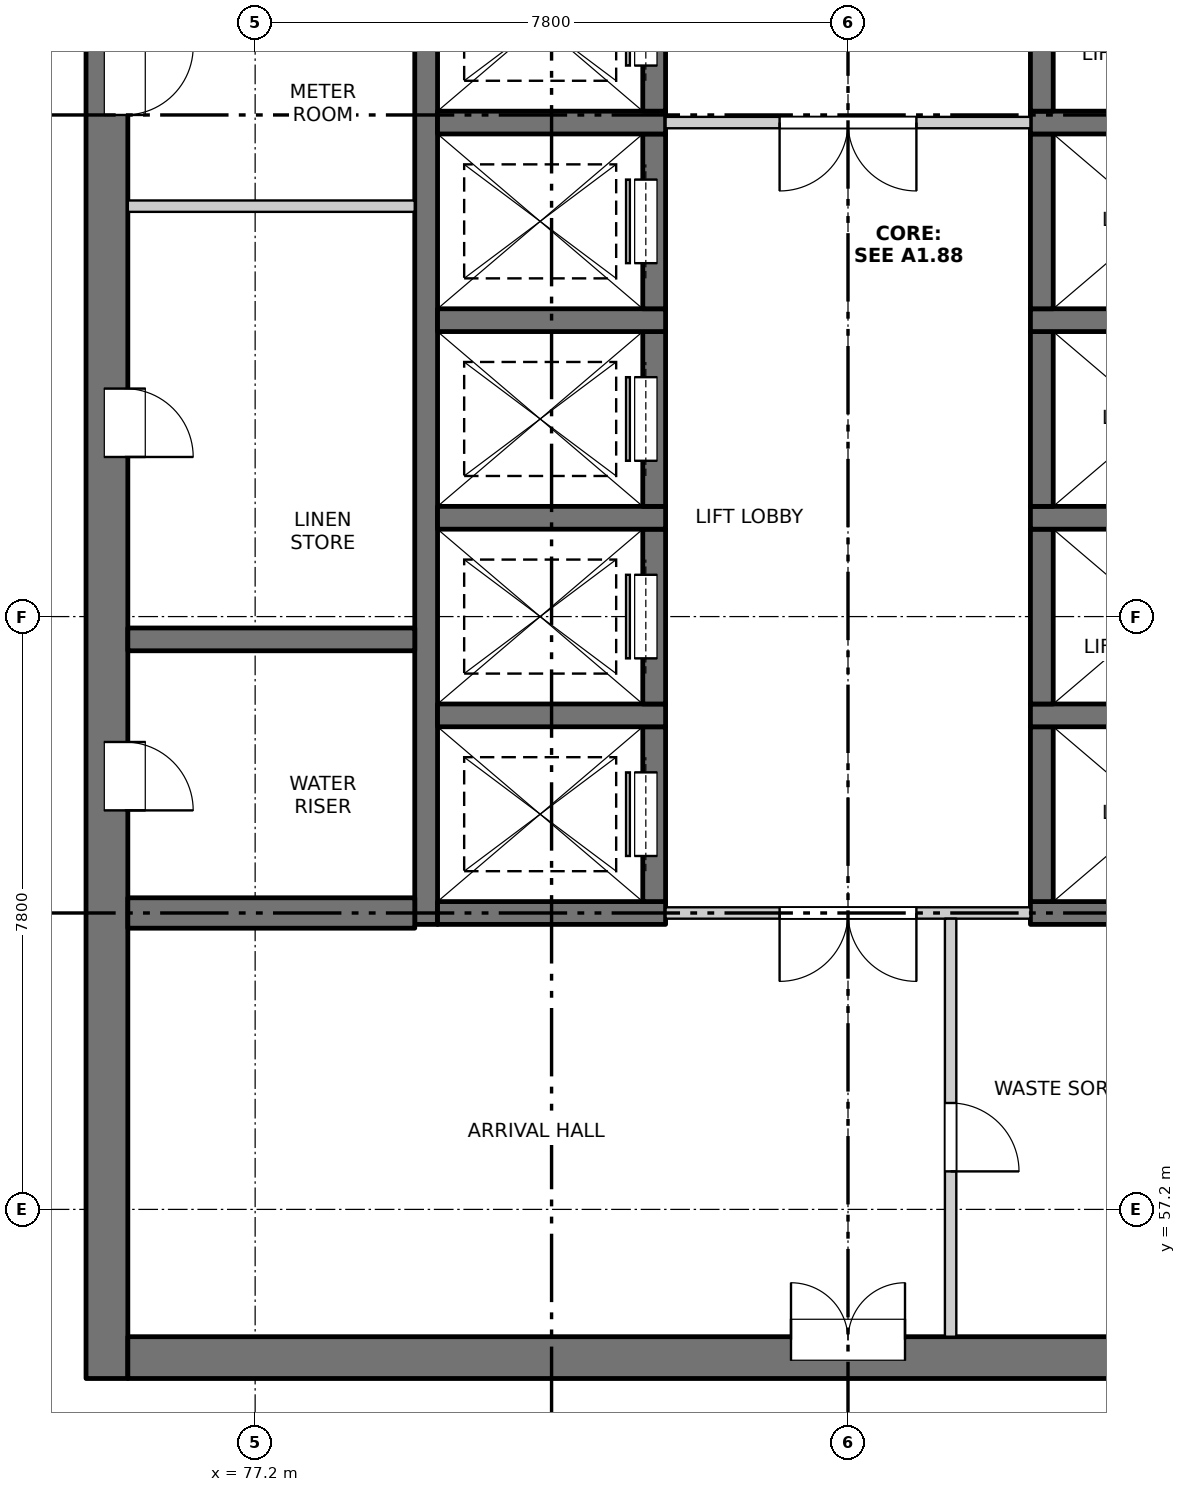
"""IFC4 building model, lengths in metres.
Left out: names, types, materials, properties, quantities, classifications, styles, units other than length and angle.
Written with IfcOpenShell. Run it as: python <this file> out.ifc"""

import sys

from ifc_helpers import new_model, si_unit, direction, frame, frame_2d, origin, place, context, subcontext, project, spatial, rectangle, extrude, element, fill, save


model = new_model("IFC4")
c1 = context("Model", 3, precision=1e-05, world=origin(), true_north=direction((0.0, 1.0)))
c2 = subcontext(c1, "Body", "Model", "MODEL_VIEW")
j1 = project(units=[si_unit("LENGTHUNIT", "METRE"), si_unit("PLANEANGLEUNIT", "RADIAN")], contexts=[c1])
p1 = place(None, origin())
s1 = spatial("IfcSite", under=j1, at=p1, CompositionType="ELEMENT")
p2 = place(p1, origin())
s2 = spatial("IfcBuilding", under=s1, at=p2, CompositionType="ELEMENT")
p3 = place(p2, frame((0.0, 0.0, 130.5)))
s3 = spatial("IfcBuildingStorey", under=s2, at=p3, CompositionType="ELEMENT", Elevation=130.5)
p4 = place(p3, frame((75.25, 54.975, -0.25), z_axis=(0.0, 0.0, 1.0), x_axis=(0.0, 1.0, 0.0)))
e1 = element("IfcWall", 1, at=p4, inside=s3, PredefinedType="SOLIDWALL", context=c2, shape_type="SweptSolid", body=[
    extrude(rectangle(XDim=22.325, YDim=0.55, at=frame_2d((11.163, 0.0))), origin(), (0.0, 0.0, 1.0), 3.4),
])
p5 = place(p4, frame((7.475, 0.0, 0.25)))
e2 = element("IfcOpeningElement", 2, at=p5, cuts=e1, PredefinedType="OPENING", context=c2, shape_type="SweptSolid", body=[
    extrude(rectangle(XDim=0.9, YDim=2.1, at=frame_2d((0.45, 1.05))), frame((0.0, 0.285, 0.0), z_axis=(0.0, -1.0, 0.0), x_axis=(1.0, 0.0, 0.0)), (0.0, 0.0, 1.0), 0.57),
])
p6 = place(p4, frame((12.125, 0.0, 0.25)))
e3 = element("IfcOpeningElement", 3, at=p6, cuts=e1, PredefinedType="OPENING", context=c2, shape_type="SweptSolid", body=[
    extrude(rectangle(XDim=0.9, YDim=2.1, at=frame_2d((0.45, 1.05))), frame((0.0, 0.285, 0.0), z_axis=(0.0, -1.0, 0.0), x_axis=(1.0, 0.0, 0.0)), (0.0, 0.0, 1.0), 0.57),
])
p7 = place(p4, frame((16.625, 0.0, 0.25)))
e4 = element("IfcOpeningElement", 4, at=p7, cuts=e1, PredefinedType="OPENING", context=c2, shape_type="SweptSolid", body=[
    extrude(rectangle(XDim=0.9, YDim=2.1, at=frame_2d((0.45, 1.05))), frame((0.0, 0.285, 0.0), z_axis=(0.0, -1.0, 0.0), x_axis=(1.0, 0.0, 0.0)), (0.0, 0.0, 1.0), 0.57),
])
p8 = place(p4, frame((20.075, 0.0, 0.25)))
e5 = element("IfcOpeningElement", 5, at=p8, cuts=e1, PredefinedType="OPENING", context=c2, shape_type="SweptSolid", body=[
    extrude(rectangle(XDim=0.9, YDim=2.1, at=frame_2d((0.45, 1.05))), frame((0.0, 0.285, 0.0), z_axis=(0.0, -1.0, 0.0), x_axis=(1.0, 0.0, 0.0)), (0.0, 0.0, 1.0), 0.57),
])
p9 = place(p3, frame((75.525, 55.25, -0.25), z_axis=(0.0, 0.0, 1.0), x_axis=(1.0, 0.0, 0.0)))
e6 = element("IfcWall", 6, at=p9, inside=s3, PredefinedType="SOLIDWALL", context=c2, shape_type="SweptSolid", body=[
    extrude(rectangle(XDim=18.95, YDim=0.55, at=frame_2d((9.475, 0.0))), origin(), (0.0, 0.0, 1.0), 3.4),
])
p10 = place(p9, frame((8.725, 0.0, 0.25)))
e7 = element("IfcOpeningElement", 7, at=p10, cuts=e6, PredefinedType="OPENING", context=c2, shape_type="SweptSolid", body=[
    extrude(rectangle(XDim=1.5, YDim=2.1, at=frame_2d((0.75, 1.05))), frame((0.0, 0.285, 0.0), z_axis=(0.0, -1.0, 0.0), x_axis=(1.0, 0.0, 0.0)), (0.0, 0.0, 1.0), 0.57),
])
p11 = place(p3, frame((79.45, 60.95, -0.25), z_axis=(0.0, 0.0, 1.0), x_axis=(0.0, 1.0, 0.0)))
e8 = element("IfcWall", 8, at=p11, inside=s3, PredefinedType="SOLIDWALL", context=c2, shape_type="SweptSolid", body=[
    extrude(rectangle(XDim=16.35, YDim=0.3, at=frame_2d((8.175, 0.0))), origin(), (0.0, 0.0, 1.0), 3.4),
])
p12 = place(p3, frame((79.6, 61.1, -0.25), z_axis=(0.0, 0.0, 1.0), x_axis=(1.0, 0.0, 0.0)))
e9 = element("IfcWall", 9, at=p12, inside=s3, PredefinedType="SOLIDWALL", context=c2, shape_type="SweptSolid", body=[
    extrude(rectangle(XDim=3.0, YDim=0.3, at=frame_2d((1.5, 0.0))), origin(), (0.0, 0.0, 1.0), 3.4),
])
p13 = place(p3, frame((82.45, 61.25, -0.25), z_axis=(0.0, 0.0, 1.0), x_axis=(0.0, 1.0, 0.0)))
e10 = element("IfcWall", 10, at=p13, inside=s3, PredefinedType="SOLIDWALL", context=c2, shape_type="SweptSolid", body=[
    extrude(rectangle(XDim=2.3, YDim=0.3, at=frame_2d((1.15, 0.0))), origin(), (0.0, 0.0, 1.0), 3.4),
])
p14 = place(p13, frame((0.6, 0.0, 0.25)))
e11 = element("IfcOpeningElement", 11, at=p14, cuts=e10, PredefinedType="OPENING", context=c2, shape_type="SweptSolid", body=[
    extrude(rectangle(XDim=1.1, YDim=2.1, at=frame_2d((0.55, 1.05))), frame((0.0, 0.16, 0.0), z_axis=(0.0, -1.0, 0.0), x_axis=(1.0, 0.0, 0.0)), (0.0, 0.0, 1.0), 0.32),
])
p15 = place(p3, frame((79.6, 63.7, -0.25), z_axis=(0.0, 0.0, 1.0), x_axis=(1.0, 0.0, 0.0)))
e12 = element("IfcWall", 12, at=p15, inside=s3, PredefinedType="SOLIDWALL", context=c2, shape_type="SweptSolid", body=[
    extrude(rectangle(XDim=3.0, YDim=0.3, at=frame_2d((1.5, 0.0))), origin(), (0.0, 0.0, 1.0), 3.4),
])
p16 = place(p3, frame((82.45, 63.85, -0.25), z_axis=(0.0, 0.0, 1.0), x_axis=(0.0, 1.0, 0.0)))
e13 = element("IfcWall", 13, at=p16, inside=s3, PredefinedType="SOLIDWALL", context=c2, shape_type="SweptSolid", body=[
    extrude(rectangle(XDim=2.3, YDim=0.3, at=frame_2d((1.15, 0.0))), origin(), (0.0, 0.0, 1.0), 3.4),
])
p17 = place(p16, frame((0.6, 0.0, 0.25)))
e14 = element("IfcOpeningElement", 14, at=p17, cuts=e13, PredefinedType="OPENING", context=c2, shape_type="SweptSolid", body=[
    extrude(rectangle(XDim=1.1, YDim=2.1, at=frame_2d((0.55, 1.05))), frame((0.0, 0.16, 0.0), z_axis=(0.0, -1.0, 0.0), x_axis=(1.0, 0.0, 0.0)), (0.0, 0.0, 1.0), 0.32),
])
p18 = place(p3, frame((79.6, 66.3, -0.25), z_axis=(0.0, 0.0, 1.0), x_axis=(1.0, 0.0, 0.0)))
e15 = element("IfcWall", 15, at=p18, inside=s3, PredefinedType="SOLIDWALL", context=c2, shape_type="SweptSolid", body=[
    extrude(rectangle(XDim=3.0, YDim=0.3, at=frame_2d((1.5, 0.0))), origin(), (0.0, 0.0, 1.0), 3.4),
])
p19 = place(p3, frame((82.45, 66.45, -0.25), z_axis=(0.0, 0.0, 1.0), x_axis=(0.0, 1.0, 0.0)))
e16 = element("IfcWall", 16, at=p19, inside=s3, PredefinedType="SOLIDWALL", context=c2, shape_type="SweptSolid", body=[
    extrude(rectangle(XDim=2.3, YDim=0.3, at=frame_2d((1.15, 0.0))), origin(), (0.0, 0.0, 1.0), 3.4),
])
p20 = place(p19, frame((0.6, 0.0, 0.25)))
e17 = element("IfcOpeningElement", 17, at=p20, cuts=e16, PredefinedType="OPENING", context=c2, shape_type="SweptSolid", body=[
    extrude(rectangle(XDim=1.1, YDim=2.1, at=frame_2d((0.55, 1.05))), frame((0.0, 0.16, 0.0), z_axis=(0.0, -1.0, 0.0), x_axis=(1.0, 0.0, 0.0)), (0.0, 0.0, 1.0), 0.32),
])
p21 = place(p3, frame((79.6, 68.9, -0.25), z_axis=(0.0, 0.0, 1.0), x_axis=(1.0, 0.0, 0.0)))
e18 = element("IfcWall", 18, at=p21, inside=s3, PredefinedType="SOLIDWALL", context=c2, shape_type="SweptSolid", body=[
    extrude(rectangle(XDim=3.0, YDim=0.3, at=frame_2d((1.5, 0.0))), origin(), (0.0, 0.0, 1.0), 3.4),
])
p22 = place(p3, frame((82.45, 69.05, -0.25), z_axis=(0.0, 0.0, 1.0), x_axis=(0.0, 1.0, 0.0)))
e19 = element("IfcWall", 19, at=p22, inside=s3, PredefinedType="SOLIDWALL", context=c2, shape_type="SweptSolid", body=[
    extrude(rectangle(XDim=2.3, YDim=0.3, at=frame_2d((1.15, 0.0))), origin(), (0.0, 0.0, 1.0), 3.4),
])
p23 = place(p22, frame((0.6, 0.0, 0.25)))
e20 = element("IfcOpeningElement", 20, at=p23, cuts=e19, PredefinedType="OPENING", context=c2, shape_type="SweptSolid", body=[
    extrude(rectangle(XDim=1.1, YDim=2.1, at=frame_2d((0.55, 1.05))), frame((0.0, 0.16, 0.0), z_axis=(0.0, -1.0, 0.0), x_axis=(1.0, 0.0, 0.0)), (0.0, 0.0, 1.0), 0.32),
])
p24 = place(p3, frame((79.6, 71.5, -0.25), z_axis=(0.0, 0.0, 1.0), x_axis=(1.0, 0.0, 0.0)))
e21 = element("IfcWall", 21, at=p24, inside=s3, PredefinedType="SOLIDWALL", context=c2, shape_type="SweptSolid", body=[
    extrude(rectangle(XDim=3.0, YDim=0.3, at=frame_2d((1.5, 0.0))), origin(), (0.0, 0.0, 1.0), 3.4),
])
p25 = place(p3, frame((82.45, 71.65, -0.25), z_axis=(0.0, 0.0, 1.0), x_axis=(0.0, 1.0, 0.0)))
e22 = element("IfcWall", 22, at=p25, inside=s3, PredefinedType="SOLIDWALL", context=c2, shape_type="SweptSolid", body=[
    extrude(rectangle(XDim=2.3, YDim=0.3, at=frame_2d((1.15, 0.0))), origin(), (0.0, 0.0, 1.0), 3.4),
])
p26 = place(p25, frame((0.6, 0.0, 0.25)))
e23 = element("IfcOpeningElement", 23, at=p26, cuts=e22, PredefinedType="OPENING", context=c2, shape_type="SweptSolid", body=[
    extrude(rectangle(XDim=1.1, YDim=2.1, at=frame_2d((0.55, 1.05))), frame((0.0, 0.16, 0.0), z_axis=(0.0, -1.0, 0.0), x_axis=(1.0, 0.0, 0.0)), (0.0, 0.0, 1.0), 0.32),
])
p27 = place(p3, frame((87.4, 61.1, -0.25), z_axis=(0.0, 0.0, 1.0), x_axis=(1.0, 0.0, 0.0)))
e24 = element("IfcWall", 24, at=p27, inside=s3, PredefinedType="SOLIDWALL", context=c2, shape_type="SweptSolid", body=[
    extrude(rectangle(XDim=3.0, YDim=0.3, at=frame_2d((1.5, 0.0))), origin(), (0.0, 0.0, 1.0), 3.4),
])
p28 = place(p3, frame((87.55, 61.25, -0.25), z_axis=(0.0, 0.0, 1.0), x_axis=(0.0, 1.0, 0.0)))
e25 = element("IfcWall", 25, at=p28, inside=s3, PredefinedType="SOLIDWALL", context=c2, shape_type="SweptSolid", body=[
    extrude(rectangle(XDim=2.3, YDim=0.3, at=frame_2d((1.15, 0.0))), origin(), (0.0, 0.0, 1.0), 3.4),
])
p29 = place(p3, frame((87.4, 63.7, -0.25), z_axis=(0.0, 0.0, 1.0), x_axis=(1.0, 0.0, 0.0)))
e26 = element("IfcWall", 26, at=p29, inside=s3, PredefinedType="SOLIDWALL", context=c2, shape_type="SweptSolid", body=[
    extrude(rectangle(XDim=3.0, YDim=0.3, at=frame_2d((1.5, 0.0))), origin(), (0.0, 0.0, 1.0), 3.4),
])
p30 = place(p3, frame((87.55, 63.85, -0.25), z_axis=(0.0, 0.0, 1.0), x_axis=(0.0, 1.0, 0.0)))
e27 = element("IfcWall", 27, at=p30, inside=s3, PredefinedType="SOLIDWALL", context=c2, shape_type="SweptSolid", body=[
    extrude(rectangle(XDim=2.3, YDim=0.3, at=frame_2d((1.15, 0.0))), origin(), (0.0, 0.0, 1.0), 3.4),
])
p31 = place(p3, frame((87.4, 66.3, -0.25), z_axis=(0.0, 0.0, 1.0), x_axis=(1.0, 0.0, 0.0)))
e28 = element("IfcWall", 28, at=p31, inside=s3, PredefinedType="SOLIDWALL", context=c2, shape_type="SweptSolid", body=[
    extrude(rectangle(XDim=3.0, YDim=0.3, at=frame_2d((1.5, 0.0))), origin(), (0.0, 0.0, 1.0), 3.4),
])
p32 = place(p3, frame((87.55, 66.45, -0.25), z_axis=(0.0, 0.0, 1.0), x_axis=(0.0, 1.0, 0.0)))
e29 = element("IfcWall", 29, at=p32, inside=s3, PredefinedType="SOLIDWALL", context=c2, shape_type="SweptSolid", body=[
    extrude(rectangle(XDim=2.3, YDim=0.3, at=frame_2d((1.15, 0.0))), origin(), (0.0, 0.0, 1.0), 3.4),
])
p33 = place(p3, frame((87.4, 68.9, -0.25), z_axis=(0.0, 0.0, 1.0), x_axis=(1.0, 0.0, 0.0)))
e30 = element("IfcWall", 30, at=p33, inside=s3, PredefinedType="SOLIDWALL", context=c2, shape_type="SweptSolid", body=[
    extrude(rectangle(XDim=3.0, YDim=0.3, at=frame_2d((1.5, 0.0))), origin(), (0.0, 0.0, 1.0), 3.4),
])
p34 = place(p3, frame((87.55, 69.05, -0.25), z_axis=(0.0, 0.0, 1.0), x_axis=(0.0, 1.0, 0.0)))
e31 = element("IfcWall", 31, at=p34, inside=s3, PredefinedType="SOLIDWALL", context=c2, shape_type="SweptSolid", body=[
    extrude(rectangle(XDim=2.3, YDim=0.3, at=frame_2d((1.15, 0.0))), origin(), (0.0, 0.0, 1.0), 3.4),
])
p35 = place(p3, frame((87.4, 71.5, -0.25), z_axis=(0.0, 0.0, 1.0), x_axis=(1.0, 0.0, 0.0)))
e32 = element("IfcWall", 32, at=p35, inside=s3, PredefinedType="SOLIDWALL", context=c2, shape_type="SweptSolid", body=[
    extrude(rectangle(XDim=3.0, YDim=0.3, at=frame_2d((1.5, 0.0))), origin(), (0.0, 0.0, 1.0), 3.4),
])
p36 = place(p3, frame((87.55, 71.65, -0.25), z_axis=(0.0, 0.0, 1.0), x_axis=(0.0, 1.0, 0.0)))
e33 = element("IfcWall", 33, at=p36, inside=s3, PredefinedType="SOLIDWALL", context=c2, shape_type="SweptSolid", body=[
    extrude(rectangle(XDim=2.3, YDim=0.3, at=frame_2d((1.15, 0.0))), origin(), (0.0, 0.0, 1.0), 3.4),
])
p37 = place(p3, frame((75.525, 61.1, -0.25), z_axis=(0.0, 0.0, 1.0), x_axis=(1.0, 0.0, 0.0)))
e34 = element("IfcWall", 34, at=p37, inside=s3, PredefinedType="SOLIDWALL", context=c2, shape_type="SweptSolid", body=[
    extrude(rectangle(XDim=3.775, YDim=0.4, at=frame_2d((1.888, 0.0))), origin(), (0.0, 0.0, 1.0), 3.4),
])
p38 = place(p3, frame((75.525, 64.7, -0.25), z_axis=(0.0, 0.0, 1.0), x_axis=(1.0, 0.0, 0.0)))
e35 = element("IfcWall", 35, at=p38, inside=s3, PredefinedType="SOLIDWALL", context=c2, shape_type="SweptSolid", body=[
    extrude(rectangle(XDim=3.775, YDim=0.3, at=frame_2d((1.888, 0.0))), origin(), (0.0, 0.0, 1.0), 3.4),
])
p39 = place(p3, frame((82.6, 61.1, 0.0), z_axis=(0.0, 0.0, 1.0), x_axis=(1.0, 0.0, 0.0)))
e36 = element("IfcWall", 36, at=p39, inside=s3, PredefinedType="PARTITIONING", context=c2, shape_type="SweptSolid", body=[
    extrude(rectangle(XDim=4.8, YDim=0.15, at=frame_2d((2.4, 0.0))), origin(), (0.0, 0.0, 1.0), 3.15),
])
p40 = place(p39, frame((1.5, 0.0, 0.0)))
e37 = element("IfcOpeningElement", 37, at=p40, cuts=e36, PredefinedType="OPENING", context=c2, shape_type="SweptSolid", body=[
    extrude(rectangle(XDim=1.8, YDim=2.1, at=frame_2d((0.9, 1.05))), frame((0.0, 0.085, 0.0), z_axis=(0.0, -1.0, 0.0), x_axis=(1.0, 0.0, 0.0)), (0.0, 0.0, 1.0), 0.17),
])
p41 = place(p3, frame((75.525, 70.4, 0.0), z_axis=(0.0, 0.0, 1.0), x_axis=(1.0, 0.0, 0.0)))
e38 = element("IfcWall", 38, at=p41, inside=s3, PredefinedType="PARTITIONING", context=c2, shape_type="SweptSolid", body=[
    extrude(rectangle(XDim=3.775, YDim=0.15, at=frame_2d((1.887, 0.0))), origin(), (0.0, 0.0, 1.0), 3.15),
])
p42 = place(p3, frame((82.6, 71.5, 0.0), z_axis=(0.0, 0.0, 1.0), x_axis=(1.0, 0.0, 0.0)))
e39 = element("IfcWall", 39, at=p42, inside=s3, PredefinedType="PARTITIONING", context=c2, shape_type="SweptSolid", body=[
    extrude(rectangle(XDim=4.8, YDim=0.15, at=frame_2d((2.4, 0.0))), origin(), (0.0, 0.0, 1.0), 3.15),
])
p43 = place(p42, frame((1.5, 0.0, 0.0)))
e40 = element("IfcOpeningElement", 40, at=p43, cuts=e39, PredefinedType="OPENING", context=c2, shape_type="SweptSolid", body=[
    extrude(rectangle(XDim=1.8, YDim=2.1, at=frame_2d((0.9, 1.05))), frame((0.0, 0.085, 0.0), z_axis=(0.0, -1.0, 0.0), x_axis=(1.0, 0.0, 0.0)), (0.0, 0.0, 1.0), 0.17),
])
p44 = place(p3, frame((86.35, 55.525, 0.0), z_axis=(0.0, 0.0, 1.0), x_axis=(0.0, 1.0, 0.0)))
e41 = element("IfcWall", 41, at=p44, inside=s3, PredefinedType="PARTITIONING", context=c2, shape_type="SweptSolid", body=[
    extrude(rectangle(XDim=5.5, YDim=0.15, at=frame_2d((2.75, 0.0))), origin(), (0.0, 0.0, 1.0), 3.15),
])
p45 = place(p44, frame((2.175, 0.0, 0.0)))
e42 = element("IfcOpeningElement", 42, at=p45, cuts=e41, PredefinedType="OPENING", context=c2, shape_type="SweptSolid", body=[
    extrude(rectangle(XDim=0.9, YDim=2.1, at=frame_2d((0.45, 1.05))), frame((0.0, 0.085, 0.0), z_axis=(0.0, -1.0, 0.0), x_axis=(1.0, 0.0, 0.0)), (0.0, 0.0, 1.0), 0.17),
])
p46 = place(p10, origin())
e43 = element("IfcDoor", 43, at=p46, inside=s3, OperationType="DOUBLE_DOOR_SINGLE_SWING", PredefinedType="DOOR", context=c2, shape_type="SweptSolid", body=[
    extrude(rectangle(XDim=1.5, YDim=2.1, at=frame_2d((0.75, 1.05))), frame((0.0, 0.26, 0.0), z_axis=(0.0, -1.0, 0.0), x_axis=(1.0, 0.0, 0.0)), (0.0, 0.0, 1.0), 0.05),
])
fill(e7, e43)
p47 = place(p45, origin())
e44 = element("IfcDoor", 44, at=p47, inside=s3, OperationType="SINGLE_SWING_RIGHT", PredefinedType="DOOR", context=c2, shape_type="SweptSolid", body=[
    extrude(rectangle(XDim=0.9, YDim=2.1, at=frame_2d((0.45, 1.05))), frame((0.0, 0.025, 0.0), z_axis=(0.0, -1.0, 0.0), x_axis=(1.0, 0.0, 0.0)), (0.0, 0.0, 1.0), 0.05),
])
fill(e42, e44)
p48 = place(p40, origin())
e45 = element("IfcDoor", 45, at=p48, inside=s3, OperationType="DOUBLE_DOOR_SINGLE_SWING", PredefinedType="DOOR", context=c2, shape_type="SweptSolid", body=[
    extrude(rectangle(XDim=1.8, YDim=2.1, at=frame_2d((0.9, 1.05))), frame((0.0, 0.025, 0.0), z_axis=(0.0, -1.0, 0.0), x_axis=(1.0, 0.0, 0.0)), (0.0, 0.0, 1.0), 0.05),
])
fill(e37, e45)
p49 = place(p14, origin())
e46 = element("IfcDoor", 46, at=p49, inside=s3, OperationType="SLIDING_TO_RIGHT", PredefinedType="DOOR", context=c2, shape_type="SweptSolid", body=[
    extrude(rectangle(XDim=1.1, YDim=2.1, at=frame_2d((0.55, 1.05))), frame((0.0, 0.135, 0.0), z_axis=(0.0, -1.0, 0.0), x_axis=(1.0, 0.0, 0.0)), (0.0, 0.0, 1.0), 0.05),
])
fill(e11, e46)
p50 = place(p5, origin())
e47 = element("IfcDoor", 47, at=p50, inside=s3, OperationType="SINGLE_SWING_RIGHT", PredefinedType="DOOR", context=c2, shape_type="SweptSolid", body=[
    extrude(rectangle(XDim=0.9, YDim=2.1, at=frame_2d((0.45, 1.05))), frame((0.0, -0.21, 0.0), z_axis=(0.0, -1.0, 0.0), x_axis=(1.0, 0.0, 0.0)), (0.0, 0.0, 1.0), 0.05),
])
fill(e2, e47)
p51 = place(p17, origin())
e48 = element("IfcDoor", 48, at=p51, inside=s3, OperationType="SLIDING_TO_RIGHT", PredefinedType="DOOR", context=c2, shape_type="SweptSolid", body=[
    extrude(rectangle(XDim=1.1, YDim=2.1, at=frame_2d((0.55, 1.05))), frame((0.0, 0.135, 0.0), z_axis=(0.0, -1.0, 0.0), x_axis=(1.0, 0.0, 0.0)), (0.0, 0.0, 1.0), 0.05),
])
fill(e14, e48)
p52 = place(p6, origin())
e49 = element("IfcDoor", 49, at=p52, inside=s3, OperationType="SINGLE_SWING_RIGHT", PredefinedType="DOOR", context=c2, shape_type="SweptSolid", body=[
    extrude(rectangle(XDim=0.9, YDim=2.1, at=frame_2d((0.45, 1.05))), frame((0.0, -0.21, 0.0), z_axis=(0.0, -1.0, 0.0), x_axis=(1.0, 0.0, 0.0)), (0.0, 0.0, 1.0), 0.05),
])
fill(e3, e49)
p53 = place(p20, origin())
e50 = element("IfcDoor", 50, at=p53, inside=s3, OperationType="SLIDING_TO_RIGHT", PredefinedType="DOOR", context=c2, shape_type="SweptSolid", body=[
    extrude(rectangle(XDim=1.1, YDim=2.1, at=frame_2d((0.55, 1.05))), frame((0.0, 0.135, 0.0), z_axis=(0.0, -1.0, 0.0), x_axis=(1.0, 0.0, 0.0)), (0.0, 0.0, 1.0), 0.05),
])
fill(e17, e50)
p54 = place(p23, origin())
e51 = element("IfcDoor", 51, at=p54, inside=s3, OperationType="SLIDING_TO_LEFT", PredefinedType="DOOR", context=c2, shape_type="SweptSolid", body=[
    extrude(rectangle(XDim=1.1, YDim=2.1, at=frame_2d((0.55, 1.05))), frame((0.0, 0.135, 0.0), z_axis=(0.0, -1.0, 0.0), x_axis=(1.0, 0.0, 0.0)), (0.0, 0.0, 1.0), 0.05),
])
fill(e20, e51)
p55 = place(p43, origin())
e52 = element("IfcDoor", 52, at=p55, inside=s3, OperationType="DOUBLE_DOOR_SINGLE_SWING", PredefinedType="DOOR", context=c2, shape_type="SweptSolid", body=[
    extrude(rectangle(XDim=1.8, YDim=2.1, at=frame_2d((0.9, 1.05))), frame((0.0, 0.025, 0.0), z_axis=(0.0, -1.0, 0.0), x_axis=(1.0, 0.0, 0.0)), (0.0, 0.0, 1.0), 0.05),
])
fill(e40, e52)
p56 = place(p7, origin())
e53 = element("IfcDoor", 53, at=p56, inside=s3, OperationType="SINGLE_SWING_LEFT", PredefinedType="DOOR", context=c2, shape_type="SweptSolid", body=[
    extrude(rectangle(XDim=0.9, YDim=2.1, at=frame_2d((0.45, 1.05))), frame((0.0, -0.21, 0.0), z_axis=(0.0, -1.0, 0.0), x_axis=(1.0, 0.0, 0.0)), (0.0, 0.0, 1.0), 0.05),
])
fill(e4, e53)
p57 = place(p26, origin())
e54 = element("IfcDoor", 54, at=p57, inside=s3, OperationType="SLIDING_TO_LEFT", PredefinedType="DOOR", context=c2, shape_type="SweptSolid", body=[
    extrude(rectangle(XDim=1.1, YDim=2.1, at=frame_2d((0.55, 1.05))), frame((0.0, 0.135, 0.0), z_axis=(0.0, -1.0, 0.0), x_axis=(1.0, 0.0, 0.0)), (0.0, 0.0, 1.0), 0.05),
])
fill(e23, e54)
save(model, sys.argv[1])
